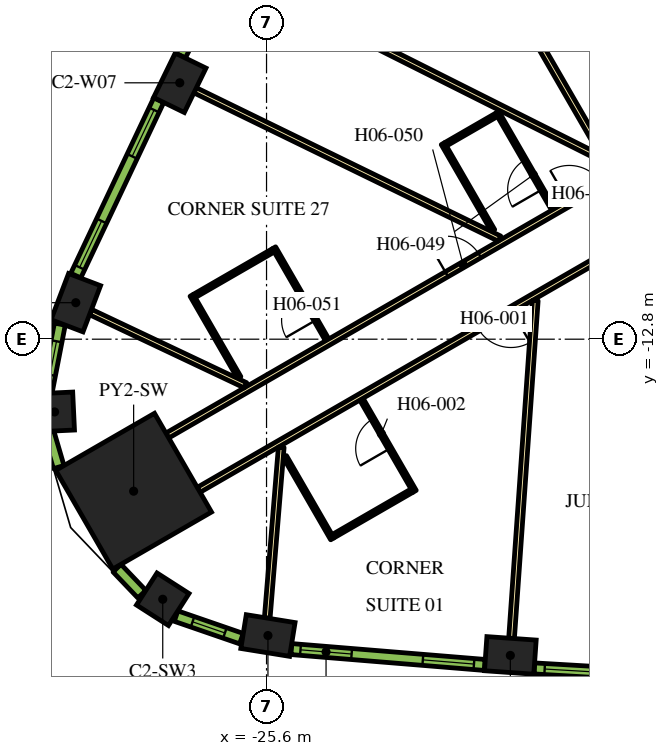
"""IFC4 building model, lengths in metres.
Left out: names, types, materials, properties, quantities, classifications, styles, units other than length and angle.
Written with IfcOpenShell. Run it as: python <this file> out.ifc"""

import sys

from ifc_helpers import new_model, si_unit, direction, frame, frame_2d, origin, origin_2d, place, context, subcontext, project, spatial, rectangle, extrude, element, fill, save


model = new_model("IFC4")
c1 = context("Model", 3, precision=1e-05, world=origin(), true_north=direction((0.0, 1.0)))
c2 = subcontext(c1, "Body", "Model", "MODEL_VIEW")
j1 = project(units=[si_unit("LENGTHUNIT", "METRE"), si_unit("PLANEANGLEUNIT", "RADIAN")], contexts=[c1])
p1 = place(None, origin())
s1 = spatial("IfcSite", under=j1, at=p1, CompositionType="ELEMENT")
p2 = place(p1, origin())
s2 = spatial("IfcBuilding", under=s1, at=p2, CompositionType="ELEMENT")
p3 = place(p2, frame((0.0, 0.0, 83.7)))
s3 = spatial("IfcBuildingStorey", under=s2, at=p3, CompositionType="ELEMENT", Elevation=83.7)
p4 = place(p3, frame((-29.097, -16.799, 0.0), z_axis=(0.0, 0.0, 1.0), x_axis=(-0.866025403784, -0.5, 0.0)))
e1 = element("IfcColumn", 1, at=p4, inside=s3, PredefinedType="COLUMN", context=c2, shape_type="SweptSolid", body=[
    extrude(rectangle(XDim=3.0, YDim=3.0, at=origin_2d()), origin(), (0.0, 0.0, 1.0), 3.9),
])
for number, where, z_axis, x_axis in (
    (2, (-25.563, -20.597, 0.0), (0.0, 0.0, 1.0), (0.987, -0.159, 0.0)),
    (3, (-19.184, -21.12, 0.0), (0.0, 0.0, 1.0), (0.998, -0.07, 0.0)),
    (4, (-27.883, -6.054, 0.0), (0.0, 0.0, 1.0), (-0.438, -0.899, 0.0)),
    (5, (-30.619, -11.839, 0.0), (0.0, 0.0, 1.0), (-0.355, -0.935, 0.0)),
):
    element("IfcColumn", number, at=place(p3, frame(where, z_axis=z_axis, x_axis=x_axis)), inside=s3, PredefinedType="COLUMN", context=c2, shape_type="SweptSolid", body=[
        extrude(rectangle(XDim=1.3, YDim=0.9, at=origin_2d()), origin(), (0.0, 0.0, 1.0), 3.9),
    ])
for number, where, z_axis, x_axis in (
    (6, (-31.177, -14.714, 0.0), (0.0, 0.0, 1.0), (0.047, -0.999, 0.0)),
    (7, (-28.331, -19.643, 0.0), (0.0, 0.0, 1.0), (0.842, -0.54, 0.0)),
):
    element("IfcColumn", number, at=place(p3, frame(where, z_axis=z_axis, x_axis=x_axis)), inside=s3, PredefinedType="COLUMN", context=c2, shape_type="SweptSolid", body=[
        extrude(rectangle(XDim=1.0, YDim=1.0, at=origin_2d()), origin(), (0.0, 0.0, 1.0), 3.9),
    ])
p5 = place(p3, frame((-12.134, -11.883, 0.0), z_axis=(0.0, 0.0, 1.0), x_axis=(-0.500005339912, 0.866022320763, 0.0)))
e8 = element("IfcWall", 8, at=p5, inside=s3, PredefinedType="SOLIDWALL", context=c2, shape_type="SweptSolid", body=[
    extrude(rectangle(XDim=9.488, YDim=0.9, at=frame_2d((4.744, 0.0))), origin(), (0.0, 0.0, 1.0), 3.9),
])
p6 = place(p3, frame((-16.412, -8.523, 0.0), z_axis=(0.0, 0.0, 1.0), x_axis=(-0.500001929737, 0.866024289647, 0.0)))
e9 = element("IfcWall", 9, at=p6, inside=s3, PredefinedType="PARTITIONING", context=c2, shape_type="SweptSolid", body=[
    extrude(rectangle(XDim=5.268, YDim=0.15, at=frame_2d((2.634, 0.0))), origin(), (0.0, 0.0, 1.0), 2.75),
])
p7 = place(p3, frame((-28.211, -15.335, 0.0), z_axis=(0.0, 0.0, 1.0), x_axis=(0.866025884867, 0.49999916674, 0.0)))
e10 = element("IfcWall", 10, at=p7, inside=s3, PredefinedType="PARTITIONING", context=c2, shape_type="SweptSolid", body=[
    extrude(rectangle(XDim=13.543, YDim=0.15, at=frame_2d((6.772, 0.0))), origin(), (0.0, 0.0, 1.0), 2.75),
])
p8 = place(p7, frame((12.214, 0.0, 0.0)))
e11 = element("IfcOpeningElement", 11, at=p8, cuts=e10, PredefinedType="OPENING", context=c2, shape_type="SweptSolid", body=[
    extrude(rectangle(XDim=1.0, YDim=2.1, at=frame_2d((0.5, 1.05))), frame((0.0, 0.085, 0.0), z_axis=(0.0, -1.0, 0.0), x_axis=(1.0, 0.0, 0.0)), (0.0, 0.0, 1.0), 0.17),
])
p9 = place(p7, frame((8.488, 0.0, 0.0)))
e12 = element("IfcOpeningElement", 12, at=p9, cuts=e10, PredefinedType="OPENING", context=c2, shape_type="SweptSolid", body=[
    extrude(rectangle(XDim=1.0, YDim=2.1, at=frame_2d((0.5, 1.05))), frame((0.0, 0.085, 0.0), z_axis=(0.0, -1.0, 0.0), x_axis=(1.0, 0.0, 0.0)), (0.0, 0.0, 1.0), 0.17),
])
p10 = place(p3, frame((-15.587, -9.952, 0.0), z_axis=(0.0, 0.0, 1.0), x_axis=(-0.866017869832, -0.500013048961, 0.0)))
e13 = element("IfcWall", 13, at=p10, inside=s3, PredefinedType="PARTITIONING", context=c2, shape_type="SweptSolid", body=[
    extrude(rectangle(XDim=13.624, YDim=0.15, at=frame_2d((6.812, 0.0))), origin(), (0.0, 0.0, 1.0), 2.75),
])
p11 = place(p10, frame((4.134, 0.0, 0.0)))
e14 = element("IfcOpeningElement", 14, at=p11, cuts=e13, PredefinedType="OPENING", context=c2, shape_type="SweptSolid", body=[
    extrude(rectangle(XDim=1.0, YDim=2.1, at=frame_2d((0.5, 1.05))), frame((0.0, 0.085, 0.0), z_axis=(0.0, -1.0, 0.0), x_axis=(1.0, 0.0, 0.0)), (0.0, 0.0, 1.0), 0.17),
])
p12 = place(p3, frame((-30.231, -12.085, 0.0), z_axis=(0.0, 0.0, 1.0), x_axis=(0.904001132572, -0.427530060122, 0.0)))
e15 = element("IfcWall", 15, at=p12, inside=s3, PredefinedType="PARTITIONING", context=c2, shape_type="SweptSolid", body=[
    extrude(rectangle(XDim=4.51, YDim=0.15, at=frame_2d((2.255, 0.0))), origin(), (0.0, 0.0, 1.0), 2.75),
])
p13 = place(p3, frame((-25.582, -20.138, 0.0), z_axis=(0.0, 0.0, 1.0), x_axis=(0.081746132986, 0.996653184283, 0.0)))
e16 = element("IfcWall", 16, at=p13, inside=s3, PredefinedType="PARTITIONING", context=c2, shape_type="SweptSolid", body=[
    extrude(rectangle(XDim=4.51, YDim=0.15, at=frame_2d((2.255, 0.0))), origin(), (0.0, 0.0, 1.0), 2.75),
])
p14 = place(p3, frame((-27.479, -6.251, 0.0), z_axis=(0.0, 0.0, 1.0), x_axis=(0.898945877276, -0.438059710231, 0.0)))
e17 = element("IfcWall", 17, at=p14, inside=s3, PredefinedType="PARTITIONING", context=c2, shape_type="SweptSolid", body=[
    extrude(rectangle(XDim=8.909, YDim=0.15, at=frame_2d((4.455, 0.0))), origin(), (0.0, 0.0, 1.0), 2.75),
])
p15 = place(p3, frame((-19.153, -20.671, 0.0), z_axis=(0.0, 0.0, 1.0), x_axis=(0.070070736723, 0.997542025107, 0.0)))
e18 = element("IfcWall", 18, at=p15, inside=s3, PredefinedType="PARTITIONING", context=c2, shape_type="SweptSolid", body=[
    extrude(rectangle(XDim=8.909, YDim=0.15, at=frame_2d((4.455, 0.0))), origin(), (0.0, 0.0, 1.0), 2.75),
])
p16 = place(p3, frame((-26.591, -3.122, 0.0), z_axis=(0.0, 0.0, 1.0), x_axis=(0.893766213273, -0.448533115847, 0.0)))
e19 = element("IfcWall", 19, at=p16, inside=s3, PredefinedType="PARTITIONING", context=c2, shape_type="SweptSolid", body=[
    extrude(rectangle(XDim=10.875, YDim=0.15, at=frame_2d((5.438, 0.0))), origin(), (0.0, 0.0, 1.0), 2.75),
])
p17 = place(p3, frame((-21.704, -16.803, 0.0), z_axis=(0.0, 0.0, 1.0), x_axis=(-0.500049511043, 0.865996816683, 0.0)))
e20 = element("IfcWall", 20, at=p17, inside=s3, PredefinedType="PARTITIONING", context=c2, shape_type="SweptSolid", body=[
    extrude(rectangle(XDim=2.8, YDim=0.1, at=frame_2d((1.4, 0.0))), origin(), (0.0, 0.0, 1.0), 2.75),
])
p18 = place(p17, frame((1.3, 0.0, 0.0)))
e21 = element("IfcOpeningElement", 21, at=p18, cuts=e20, PredefinedType="OPENING", context=c2, shape_type="SweptSolid", body=[
    extrude(rectangle(XDim=0.9, YDim=2.1, at=frame_2d((0.45, 1.05))), frame((0.0, 0.06, 0.0), z_axis=(0.0, -1.0, 0.0), x_axis=(1.0, 0.0, 0.0)), (0.0, 0.0, 1.0), 0.12),
])
p19 = place(p3, frame((-21.772, -16.785, 0.0), z_axis=(0.0, 0.0, 1.0), x_axis=(-0.866024647952, -0.500001309137, 0.0)))
e22 = element("IfcWall", 22, at=p19, inside=s3, PredefinedType="PARTITIONING", context=c2, shape_type="SweptSolid", body=[
    extrude(rectangle(XDim=2.4, YDim=0.1, at=frame_2d((1.2, 0.0))), origin(), (0.0, 0.0, 1.0), 2.75),
])
p20 = place(p3, frame((-25.119, -15.888, 0.0), z_axis=(0.0, 0.0, 1.0), x_axis=(0.500046524342, -0.865998541277, 0.0)))
e23 = element("IfcWall", 23, at=p20, inside=s3, PredefinedType="PARTITIONING", context=c2, shape_type="SweptSolid", body=[
    extrude(rectangle(XDim=2.5, YDim=0.1, at=frame_2d((1.25, 0.0))), origin(), (0.0, 0.0, 1.0), 2.75),
])
p21 = place(p3, frame((-18.055, -9.385, 0.0), z_axis=(0.0, 0.0, 1.0), x_axis=(-0.499939757307, 0.866060182126, 0.0)))
e24 = element("IfcWall", 24, at=p21, inside=s3, PredefinedType="PARTITIONING", context=c2, shape_type="SweptSolid", body=[
    extrude(rectangle(XDim=2.95, YDim=0.1, at=frame_2d((1.475, 0.0))), origin(), (0.0, 0.0, 1.0), 2.75),
])
p22 = place(p21, frame((0.6, 0.0, 0.0)))
e25 = element("IfcOpeningElement", 25, at=p22, cuts=e24, PredefinedType="OPENING", context=c2, shape_type="SweptSolid", body=[
    extrude(rectangle(XDim=0.9, YDim=2.1, at=frame_2d((0.45, 1.05))), frame((0.0, 0.06, 0.0), z_axis=(0.0, -1.0, 0.0), x_axis=(1.0, 0.0, 0.0)), (0.0, 0.0, 1.0), 0.12),
])
p23 = place(p3, frame((-19.549, -6.898, 0.0), z_axis=(0.0, 0.0, 1.0), x_axis=(-0.866043940782, -0.499967891604, 0.0)))
e26 = element("IfcWall", 26, at=p23, inside=s3, PredefinedType="PARTITIONING", context=c2, shape_type="SweptSolid", body=[
    extrude(rectangle(XDim=1.55, YDim=0.1, at=frame_2d((0.775, 0.0))), origin(), (0.0, 0.0, 1.0), 2.75),
])
p24 = place(p3, frame((-19.639, -9.941, 0.0), z_axis=(0.0, 0.0, 1.0), x_axis=(-0.499938597367, 0.866060851709, 0.0)))
e27 = element("IfcWall", 27, at=p24, inside=s3, PredefinedType="PARTITIONING", context=c2, shape_type="SweptSolid", body=[
    extrude(rectangle(XDim=2.64, YDim=0.1, at=frame_2d((1.32, 0.0))), origin(), (0.0, 0.0, 1.0), 2.75),
])
p25 = place(p3, frame((-24.004, -12.82, 0.0), z_axis=(0.0, 0.0, 1.0), x_axis=(-0.500011755427, 0.866018616679, 0.0)))
e28 = element("IfcWall", 28, at=p25, inside=s3, PredefinedType="PARTITIONING", context=c2, shape_type="SweptSolid", body=[
    extrude(rectangle(XDim=2.8, YDim=0.1, at=frame_2d((1.4, 0.0))), origin(), (0.0, 0.0, 1.0), 2.75),
])
p26 = place(p25, frame((0.6, 0.0, 0.0)))
e29 = element("IfcOpeningElement", 29, at=p26, cuts=e28, PredefinedType="OPENING", context=c2, shape_type="SweptSolid", body=[
    extrude(rectangle(XDim=0.9, YDim=2.1, at=frame_2d((0.45, 1.05))), frame((0.0, 0.06, 0.0), z_axis=(0.0, -1.0, 0.0), x_axis=(1.0, 0.0, 0.0)), (0.0, 0.0, 1.0), 0.12),
])
p27 = place(p3, frame((-25.422, -10.463, 0.0), z_axis=(0.0, 0.0, 1.0), x_axis=(-0.866024647952, -0.500001309137, 0.0)))
e30 = element("IfcWall", 30, at=p27, inside=s3, PredefinedType="PARTITIONING", context=c2, shape_type="SweptSolid", body=[
    extrude(rectangle(XDim=2.4, YDim=0.1, at=frame_2d((1.2, 0.0))), origin(), (0.0, 0.0, 1.0), 2.75),
])
p28 = place(p3, frame((-26.319, -13.81, 0.0), z_axis=(0.0, 0.0, 1.0), x_axis=(-0.499961950354, 0.866047370643, 0.0)))
e31 = element("IfcWall", 31, at=p28, inside=s3, PredefinedType="PARTITIONING", context=c2, shape_type="SweptSolid", body=[
    extrude(rectangle(XDim=2.5, YDim=0.1, at=frame_2d((1.25, 0.0))), origin(), (0.0, 0.0, 1.0), 2.75),
])
p29 = place(p3, frame((-24.946, -20.954, 0.0), z_axis=(0.0, 0.0, 1.0), x_axis=(0.99665273362, -0.081751627308, 0.0)))
e32 = element("IfcWall", 32, at=p29, inside=s3, PredefinedType="SOLIDWALL", context=c2, shape_type="SweptSolid", body=[
    extrude(rectangle(XDim=5.107, YDim=0.29, at=frame_2d((2.553, 0.0))), origin(), (0.0, 0.0, 1.0), 3.65),
])
p30 = place(p29, frame((0.24, 0.0, 0.9)))
e33 = element("IfcOpeningElement", 33, at=p30, cuts=e32, PredefinedType="OPENING", context=c2, shape_type="SweptSolid", body=[
    extrude(rectangle(XDim=1.35, YDim=2.15, at=frame_2d((0.675, 1.075))), frame((0.0, 0.155, 0.0), z_axis=(0.0, -1.0, 0.0), x_axis=(1.0, 0.0, 0.0)), (0.0, 0.0, 1.0), 0.31),
])
p31 = place(p29, frame((3.471, 0.0, 0.9)))
e34 = element("IfcOpeningElement", 34, at=p31, cuts=e32, PredefinedType="OPENING", context=c2, shape_type="SweptSolid", body=[
    extrude(rectangle(XDim=1.35, YDim=2.15, at=frame_2d((0.675, 1.075))), frame((0.0, 0.155, 0.0), z_axis=(0.0, -1.0, 0.0), x_axis=(1.0, 0.0, 0.0)), (0.0, 0.0, 1.0), 0.31),
])
p32 = place(p3, frame((-18.553, -21.463, 0.0), z_axis=(0.0, 0.0, 1.0), x_axis=(0.998290511436, -0.058447025388, 0.0)))
e35 = element("IfcWall", 35, at=p32, inside=s3, PredefinedType="SOLIDWALL", context=c2, shape_type="SweptSolid", body=[
    extrude(rectangle(XDim=5.1, YDim=0.29, at=frame_2d((2.55, 0.0))), origin(), (0.0, 0.0, 1.0), 3.65),
])
p33 = place(p32, frame((0.273, 0.0, 0.9)))
e36 = element("IfcOpeningElement", 36, at=p33, cuts=e35, PredefinedType="OPENING", context=c2, shape_type="SweptSolid", body=[
    extrude(rectangle(XDim=1.35, YDim=2.15, at=frame_2d((0.675, 1.075))), frame((0.0, 0.155, 0.0), z_axis=(0.0, -1.0, 0.0), x_axis=(1.0, 0.0, 0.0)), (0.0, 0.0, 1.0), 0.31),
])
p34 = place(p32, frame((3.478, 0.0, 0.9)))
e37 = element("IfcOpeningElement", 37, at=p34, cuts=e35, PredefinedType="OPENING", context=c2, shape_type="SweptSolid", body=[
    extrude(rectangle(XDim=1.35, YDim=2.15, at=frame_2d((0.675, 1.075))), frame((0.0, 0.155, 0.0), z_axis=(0.0, -1.0, 0.0), x_axis=(1.0, 0.0, 0.0)), (0.0, 0.0, 1.0), 0.31),
])
p35 = place(p3, frame((-25.576, -0.778, 0.0), z_axis=(0.0, 0.0, 1.0), x_axis=(-0.448534297211, -0.893765620409, 0.0)))
e38 = element("IfcWall", 38, at=p35, inside=s3, PredefinedType="SOLIDWALL", context=c2, shape_type="SweptSolid", body=[
    extrude(rectangle(XDim=5.1, YDim=0.29, at=frame_2d((2.55, 0.0))), origin(), (0.0, 0.0, 1.0), 3.65),
])
p36 = place(p35, frame((0.272, 0.0, 0.9)))
e39 = element("IfcOpeningElement", 39, at=p36, cuts=e38, PredefinedType="OPENING", context=c2, shape_type="SweptSolid", body=[
    extrude(rectangle(XDim=1.35, YDim=2.15, at=frame_2d((0.675, 1.075))), frame((0.0, 0.155, 0.0), z_axis=(0.0, -1.0, 0.0), x_axis=(1.0, 0.0, 0.0)), (0.0, 0.0, 1.0), 0.31),
])
p37 = place(p35, frame((3.478, 0.0, 0.9)))
e40 = element("IfcOpeningElement", 40, at=p37, cuts=e38, PredefinedType="OPENING", context=c2, shape_type="SweptSolid", body=[
    extrude(rectangle(XDim=1.35, YDim=2.15, at=frame_2d((0.675, 1.075))), frame((0.0, 0.155, 0.0), z_axis=(0.0, -1.0, 0.0), x_axis=(1.0, 0.0, 0.0)), (0.0, 0.0, 1.0), 0.31),
])
p38 = place(p3, frame((-28.436, -6.511, 0.0), z_axis=(0.0, 0.0, 1.0), x_axis=(-0.427543726596, -0.903994669148, 0.0)))
e41 = element("IfcWall", 41, at=p38, inside=s3, PredefinedType="SOLIDWALL", context=c2, shape_type="SweptSolid", body=[
    extrude(rectangle(XDim=5.107, YDim=0.29, at=frame_2d((2.553, 0.0))), origin(), (0.0, 0.0, 1.0), 3.65),
])
p39 = place(p38, frame((0.285, 0.0, 0.9)))
e42 = element("IfcOpeningElement", 42, at=p39, cuts=e41, PredefinedType="OPENING", context=c2, shape_type="SweptSolid", body=[
    extrude(rectangle(XDim=1.35, YDim=2.15, at=frame_2d((0.675, 1.075))), frame((0.0, 0.155, 0.0), z_axis=(0.0, -1.0, 0.0), x_axis=(1.0, 0.0, 0.0)), (0.0, 0.0, 1.0), 0.31),
])
p40 = place(p38, frame((3.516, 0.0, 0.9)))
e43 = element("IfcOpeningElement", 43, at=p40, cuts=e41, PredefinedType="OPENING", context=c2, shape_type="SweptSolid", body=[
    extrude(rectangle(XDim=1.35, YDim=2.15, at=frame_2d((0.675, 1.075))), frame((0.0, 0.155, 0.0), z_axis=(0.0, -1.0, 0.0), x_axis=(1.0, 0.0, 0.0)), (0.0, 0.0, 1.0), 0.31),
])
p41 = place(p3, frame((-31.039, -12.403, 0.0), z_axis=(0.0, 0.0, 1.0), x_axis=(-0.190409913989, -0.981704672829, 0.0)))
e44 = element("IfcWall", 44, at=p41, inside=s3, PredefinedType="SOLIDWALL", context=c2, shape_type="SweptSolid", body=[
    extrude(rectangle(XDim=1.819, YDim=0.29, at=frame_2d((0.91, 0.0))), origin(), (0.0, 0.0, 1.0), 3.65),
])
p42 = place(p41, frame((0.46, 0.0, 0.9)))
e45 = element("IfcOpeningElement", 45, at=p42, cuts=e44, PredefinedType="OPENING", context=c2, shape_type="SweptSolid", body=[
    extrude(rectangle(XDim=0.9, YDim=2.15, at=frame_2d((0.45, 1.075))), frame((0.0, 0.155, 0.0), z_axis=(0.0, -1.0, 0.0), x_axis=(1.0, 0.0, 0.0)), (0.0, 0.0, 1.0), 0.31),
])
p43 = place(p3, frame((-31.336, -15.256, 0.0), z_axis=(0.0, 0.0, 1.0), x_axis=(0.281454582132, -0.95957455062, 0.0)))
e46 = element("IfcWall", 46, at=p43, inside=s3, PredefinedType="SOLIDWALL", context=c2, shape_type="SweptSolid", body=[
    extrude(rectangle(XDim=0.947, YDim=0.29, at=frame_2d((0.474, 0.0))), origin(), (0.0, 0.0, 1.0), 3.65),
])
p44 = place(p3, frame((-29.534, -18.824, 0.0), z_axis=(0.0, 0.0, 1.0), x_axis=(0.690414427296, -0.723414071319, 0.0)))
e47 = element("IfcWall", 47, at=p44, inside=s3, PredefinedType="SOLIDWALL", context=c2, shape_type="SweptSolid", body=[
    extrude(rectangle(XDim=0.947, YDim=0.29, at=frame_2d((0.474, 0.0))), origin(), (0.0, 0.0, 1.0), 3.65),
])
p45 = place(p3, frame((-27.981, -20.086, 0.0), z_axis=(0.0, 0.0, 1.0), x_axis=(0.945385815453, -0.325953462844, 0.0)))
e48 = element("IfcWall", 48, at=p45, inside=s3, PredefinedType="SOLIDWALL", context=c2, shape_type="SweptSolid", body=[
    extrude(rectangle(XDim=1.819, YDim=0.29, at=frame_2d((0.91, 0.0))), origin(), (0.0, 0.0, 1.0), 3.65),
])
p46 = place(p45, frame((0.46, 0.0, 0.9)))
e49 = element("IfcOpeningElement", 49, at=p46, cuts=e48, PredefinedType="OPENING", context=c2, shape_type="SweptSolid", body=[
    extrude(rectangle(XDim=0.9, YDim=2.15, at=frame_2d((0.45, 1.075))), frame((0.0, 0.155, 0.0), z_axis=(0.0, -1.0, 0.0), x_axis=(1.0, 0.0, 0.0)), (0.0, 0.0, 1.0), 0.31),
])
p47 = place(p11, origin())
e50 = element("IfcDoor", 50, at=p47, inside=s3, OperationType="SINGLE_SWING_LEFT", PredefinedType="DOOR", context=c2, shape_type="SweptSolid", body=[
    extrude(rectangle(XDim=1.0, YDim=2.1, at=frame_2d((0.5, 1.05))), frame((0.0, 0.025, 0.0), z_axis=(0.0, -1.0, 0.0), x_axis=(1.0, 0.0, 0.0)), (0.0, 0.0, 1.0), 0.05),
])
fill(e14, e50)
p48 = place(p18, origin())
e51 = element("IfcDoor", 51, at=p48, inside=s3, OperationType="SINGLE_SWING_LEFT", PredefinedType="DOOR", context=c2, shape_type="SweptSolid", body=[
    extrude(rectangle(XDim=0.9, YDim=2.1, at=frame_2d((0.45, 1.05))), frame((0.0, 0.025, 0.0), z_axis=(0.0, -1.0, 0.0), x_axis=(1.0, 0.0, 0.0)), (0.0, 0.0, 1.0), 0.05),
])
fill(e21, e51)
p49 = place(p8, origin())
e52 = element("IfcDoor", 52, at=p49, inside=s3, OperationType="SINGLE_SWING_RIGHT", PredefinedType="DOOR", context=c2, shape_type="SweptSolid", body=[
    extrude(rectangle(XDim=1.0, YDim=2.1, at=frame_2d((0.5, 1.05))), frame((0.0, 0.025, 0.0), z_axis=(0.0, -1.0, 0.0), x_axis=(1.0, 0.0, 0.0)), (0.0, 0.0, 1.0), 0.05),
])
fill(e11, e52)
p50 = place(p22, origin())
e53 = element("IfcDoor", 53, at=p50, inside=s3, OperationType="SINGLE_SWING_LEFT", PredefinedType="DOOR", context=c2, shape_type="SweptSolid", body=[
    extrude(rectangle(XDim=0.9, YDim=2.1, at=frame_2d((0.45, 1.05))), frame((0.0, 0.025, 0.0), z_axis=(0.0, -1.0, 0.0), x_axis=(1.0, 0.0, 0.0)), (0.0, 0.0, 1.0), 0.05),
])
fill(e25, e53)
p51 = place(p9, origin())
e54 = element("IfcDoor", 54, at=p51, inside=s3, OperationType="SINGLE_SWING_RIGHT", PredefinedType="DOOR", context=c2, shape_type="SweptSolid", body=[
    extrude(rectangle(XDim=1.0, YDim=2.1, at=frame_2d((0.5, 1.05))), frame((0.0, 0.025, 0.0), z_axis=(0.0, -1.0, 0.0), x_axis=(1.0, 0.0, 0.0)), (0.0, 0.0, 1.0), 0.05),
])
fill(e12, e54)
p52 = place(p26, origin())
e55 = element("IfcDoor", 55, at=p52, inside=s3, OperationType="SINGLE_SWING_RIGHT", PredefinedType="DOOR", context=c2, shape_type="SweptSolid", body=[
    extrude(rectangle(XDim=0.9, YDim=2.1, at=frame_2d((0.45, 1.05))), frame((0.0, 0.025, 0.0), z_axis=(0.0, -1.0, 0.0), x_axis=(1.0, 0.0, 0.0)), (0.0, 0.0, 1.0), 0.05),
])
fill(e29, e55)
p53 = place(p30, origin())
e56 = element("IfcWindow", 56, at=p53, inside=s3, PartitioningType="DOUBLE_PANEL_VERTICAL", PredefinedType="WINDOW", context=c2, shape_type="SweptSolid", body=[
    extrude(rectangle(XDim=1.35, YDim=2.15, at=frame_2d((0.675, 1.075))), frame((0.0, 0.015, 0.0), z_axis=(0.0, -1.0, 0.0), x_axis=(1.0, 0.0, 0.0)), (0.0, 0.0, 1.0), 0.06),
])
fill(e33, e56)
p54 = place(p31, origin())
e57 = element("IfcWindow", 57, at=p54, inside=s3, PartitioningType="DOUBLE_PANEL_VERTICAL", PredefinedType="WINDOW", context=c2, shape_type="SweptSolid", body=[
    extrude(rectangle(XDim=1.35, YDim=2.15, at=frame_2d((0.675, 1.075))), frame((0.0, 0.015, 0.0), z_axis=(0.0, -1.0, 0.0), x_axis=(1.0, 0.0, 0.0)), (0.0, 0.0, 1.0), 0.06),
])
fill(e34, e57)
p55 = place(p33, origin())
e58 = element("IfcWindow", 58, at=p55, inside=s3, PartitioningType="DOUBLE_PANEL_VERTICAL", PredefinedType="WINDOW", context=c2, shape_type="SweptSolid", body=[
    extrude(rectangle(XDim=1.35, YDim=2.15, at=frame_2d((0.675, 1.075))), frame((0.0, 0.015, 0.0), z_axis=(0.0, -1.0, 0.0), x_axis=(1.0, 0.0, 0.0)), (0.0, 0.0, 1.0), 0.06),
])
fill(e36, e58)
p56 = place(p39, origin())
e59 = element("IfcWindow", 59, at=p56, inside=s3, PartitioningType="DOUBLE_PANEL_VERTICAL", PredefinedType="WINDOW", context=c2, shape_type="SweptSolid", body=[
    extrude(rectangle(XDim=1.35, YDim=2.15, at=frame_2d((0.675, 1.075))), frame((0.0, 0.015, 0.0), z_axis=(0.0, -1.0, 0.0), x_axis=(1.0, 0.0, 0.0)), (0.0, 0.0, 1.0), 0.06),
])
fill(e42, e59)
p57 = place(p40, origin())
e60 = element("IfcWindow", 60, at=p57, inside=s3, PartitioningType="DOUBLE_PANEL_VERTICAL", PredefinedType="WINDOW", context=c2, shape_type="SweptSolid", body=[
    extrude(rectangle(XDim=1.35, YDim=2.15, at=frame_2d((0.675, 1.075))), frame((0.0, 0.015, 0.0), z_axis=(0.0, -1.0, 0.0), x_axis=(1.0, 0.0, 0.0)), (0.0, 0.0, 1.0), 0.06),
])
fill(e43, e60)
p58 = place(p42, origin())
e61 = element("IfcWindow", 61, at=p58, inside=s3, PartitioningType="SINGLE_PANEL", PredefinedType="WINDOW", context=c2, shape_type="SweptSolid", body=[
    extrude(rectangle(XDim=0.9, YDim=2.15, at=frame_2d((0.45, 1.075))), frame((0.0, 0.015, 0.0), z_axis=(0.0, -1.0, 0.0), x_axis=(1.0, 0.0, 0.0)), (0.0, 0.0, 1.0), 0.06),
])
fill(e45, e61)
p59 = place(p46, origin())
e62 = element("IfcWindow", 62, at=p59, inside=s3, PartitioningType="SINGLE_PANEL", PredefinedType="WINDOW", context=c2, shape_type="SweptSolid", body=[
    extrude(rectangle(XDim=0.9, YDim=2.15, at=frame_2d((0.45, 1.075))), frame((0.0, 0.015, 0.0), z_axis=(0.0, -1.0, 0.0), x_axis=(1.0, 0.0, 0.0)), (0.0, 0.0, 1.0), 0.06),
])
fill(e49, e62)
save(model, sys.argv[1])
